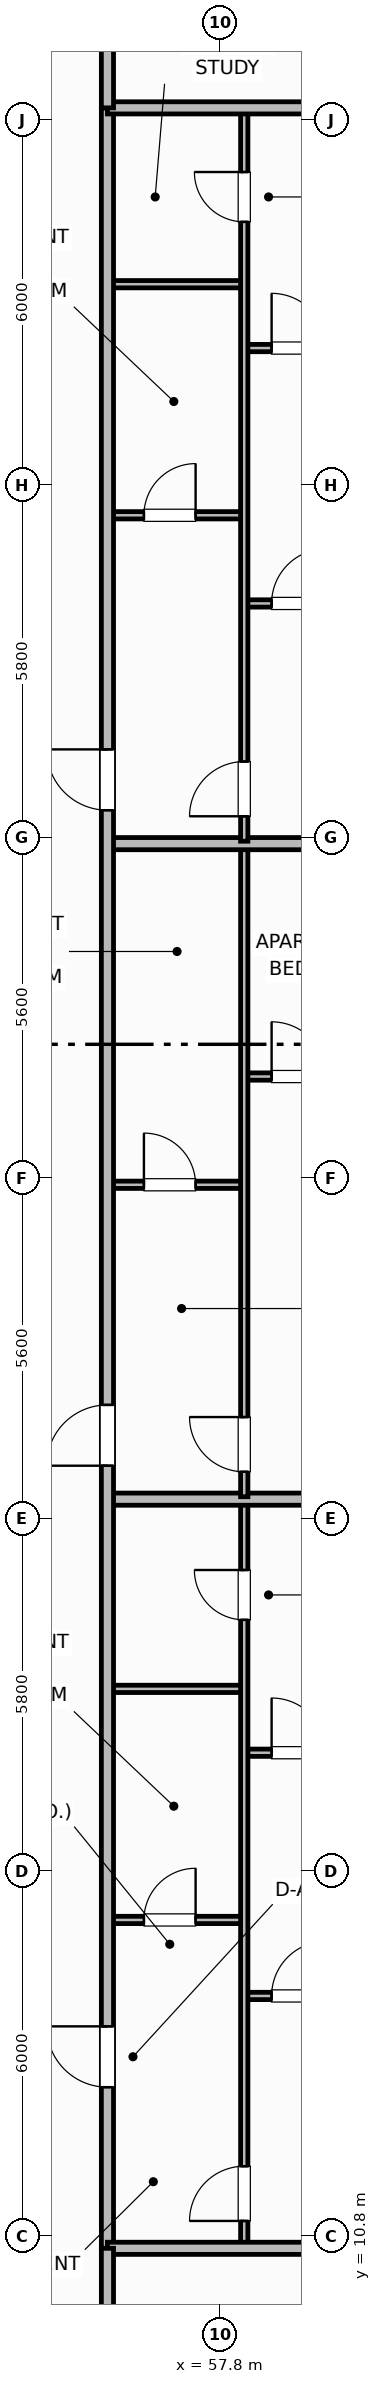
"""IFC4 building model, lengths in metres.
Left out: names, types, materials, properties, quantities, classifications, styles, units other than length and angle.
Written with IfcOpenShell. Run it as: python <this file> out.ifc"""

import sys

from ifc_helpers import new_model, si_unit, direction, frame, frame_2d, origin, place, context, subcontext, project, spatial, rectangle, extrude, element, fill, save


model = new_model("IFC4")
c1 = context("Model", 3, precision=1e-05, world=origin(), true_north=direction((0.0, 1.0)))
c2 = subcontext(c1, "Body", "Model", "MODEL_VIEW")
j1 = project(units=[si_unit("LENGTHUNIT", "METRE"), si_unit("PLANEANGLEUNIT", "RADIAN")], contexts=[c1])
p1 = place(None, origin())
s1 = spatial("IfcSite", under=j1, at=p1, CompositionType="ELEMENT")
p2 = place(p1, origin())
s2 = spatial("IfcBuilding", under=s1, at=p2, CompositionType="ELEMENT")
p3 = place(p2, frame((0.0, 0.0, 73.2)))
s3 = spatial("IfcBuildingStorey", under=s2, at=p3, CompositionType="ELEMENT", Elevation=73.2)
p4 = place(p3, frame((55.95, 16.0, 0.0), z_axis=(0.0, 0.0, 1.0), x_axis=(1.0, 0.0, 0.0)))
e1 = element("IfcWall", 1, at=p4, inside=s3, PredefinedType="PARTITIONING", context=c2, shape_type="SweptSolid", body=[
    extrude(rectangle(XDim=2.25, YDim=0.12, at=frame_2d((1.125, 0.0))), origin(), (0.0, 0.0, 1.0), 2.49),
])
p5 = place(p4, frame((0.6, 0.0, 0.0)))
e2 = element("IfcOpeningElement", 2, at=p5, cuts=e1, PredefinedType="OPENING", context=c2, shape_type="SweptSolid", body=[
    extrude(rectangle(XDim=0.85, YDim=2.1, at=frame_2d((0.425, 1.05))), frame((0.0, 0.07, 0.0), z_axis=(0.0, -1.0, 0.0), x_axis=(1.0, 0.0, 0.0)), (0.0, 0.0, 1.0), 0.14),
])
p6 = place(p3, frame((55.95, 19.8, 0.0), z_axis=(0.0, 0.0, 1.0), x_axis=(1.0, 0.0, 0.0)))
e3 = element("IfcWall", 3, at=p6, inside=s3, PredefinedType="PARTITIONING", context=c2, shape_type="SweptSolid", body=[
    extrude(rectangle(XDim=2.25, YDim=0.12, at=frame_2d((1.125, 0.0))), origin(), (0.0, 0.0, 1.0), 2.49),
])
p7 = place(p3, frame((58.2, 14.75, 0.0), z_axis=(0.0, 0.0, 1.0), x_axis=(1.0, 0.0, 0.0)))
e4 = element("IfcWall", 4, at=p7, inside=s3, PredefinedType="PARTITIONING", context=c2, shape_type="SweptSolid", body=[
    extrude(rectangle(XDim=5.63, YDim=0.12, at=frame_2d((2.815, 0.0))), origin(), (0.0, 0.0, 1.0), 2.49),
])
p8 = place(p7, frame((0.45, 0.0, 0.0)))
e5 = element("IfcOpeningElement", 5, at=p8, cuts=e4, PredefinedType="OPENING", context=c2, shape_type="SweptSolid", body=[
    extrude(rectangle(XDim=0.9, YDim=2.1, at=frame_2d((0.45, 1.05))), frame((0.0, 0.07, 0.0), z_axis=(0.0, -1.0, 0.0), x_axis=(1.0, 0.0, 0.0)), (0.0, 0.0, 1.0), 0.14),
])
p9 = place(p3, frame((58.2, 18.75, 0.0), z_axis=(0.0, 0.0, 1.0), x_axis=(1.0, 0.0, 0.0)))
e6 = element("IfcWall", 6, at=p9, inside=s3, PredefinedType="PARTITIONING", context=c2, shape_type="SweptSolid", body=[
    extrude(rectangle(XDim=5.63, YDim=0.12, at=frame_2d((2.815, 0.0))), origin(), (0.0, 0.0, 1.0), 2.49),
])
p10 = place(p9, frame((0.45, 0.0, 0.0)))
e7 = element("IfcOpeningElement", 7, at=p10, cuts=e6, PredefinedType="OPENING", context=c2, shape_type="SweptSolid", body=[
    extrude(rectangle(XDim=0.9, YDim=2.1, at=frame_2d((0.45, 1.05))), frame((0.0, 0.07, 0.0), z_axis=(0.0, -1.0, 0.0), x_axis=(1.0, 0.0, 0.0)), (0.0, 0.0, 1.0), 0.14),
])
p11 = place(p3, frame((58.2, 10.64, 0.0), z_axis=(0.0, 0.0, 1.0), x_axis=(0.0, 1.0, 0.0)))
e8 = element("IfcWall", 8, at=p11, inside=s3, PredefinedType="PARTITIONING", context=c2, shape_type="SweptSolid", body=[
    extrude(rectangle(XDim=12.24, YDim=0.12, at=frame_2d((6.12, 0.0))), origin(), (0.0, 0.0, 1.0), 2.49),
])
p12 = place(p11, frame((0.41, 0.0, 0.0)))
e9 = element("IfcOpeningElement", 9, at=p12, cuts=e8, PredefinedType="OPENING", context=c2, shape_type="SweptSolid", body=[
    extrude(rectangle(XDim=0.9, YDim=2.1, at=frame_2d((0.45, 1.05))), frame((0.0, 0.07, 0.0), z_axis=(0.0, -1.0, 0.0), x_axis=(1.0, 0.0, 0.0)), (0.0, 0.0, 1.0), 0.14),
])
p13 = place(p11, frame((10.295, 0.0, 0.0)))
e10 = element("IfcOpeningElement", 10, at=p13, cuts=e8, PredefinedType="OPENING", context=c2, shape_type="SweptSolid", body=[
    extrude(rectangle(XDim=0.82, YDim=2.08, at=frame_2d((0.41, 1.04))), frame((0.0, 0.07, 0.0), z_axis=(0.0, -1.0, 0.0), x_axis=(1.0, 0.0, 0.0)), (0.0, 0.0, 1.0), 0.14),
])
p14 = place(p3, frame((55.95, 22.92, 0.0), z_axis=(0.0, 0.0, 1.0), x_axis=(1.0, 0.0, 0.0)))
e11 = element("IfcWall", 11, at=p14, inside=s3, PredefinedType="PARTITIONING", context=c2, shape_type="SweptSolid", body=[
    extrude(rectangle(XDim=7.88, YDim=0.2, at=frame_2d((3.94, 0.0))), origin(), (0.0, 0.0, 1.0), 2.49),
])
p15 = place(p3, frame((55.95, 28.09, 0.0), z_axis=(0.0, 0.0, 1.0), x_axis=(1.0, 0.0, 0.0)))
e12 = element("IfcWall", 12, at=p15, inside=s3, PredefinedType="PARTITIONING", context=c2, shape_type="SweptSolid", body=[
    extrude(rectangle(XDim=2.25, YDim=0.12, at=frame_2d((1.125, 0.0))), origin(), (0.0, 0.0, 1.0), 2.49),
])
p16 = place(p15, frame((0.6, 0.0, 0.0)))
e13 = element("IfcOpeningElement", 13, at=p16, cuts=e12, PredefinedType="OPENING", context=c2, shape_type="SweptSolid", body=[
    extrude(rectangle(XDim=0.85, YDim=2.1, at=frame_2d((0.425, 1.05))), frame((0.0, 0.07, 0.0), z_axis=(0.0, -1.0, 0.0), x_axis=(1.0, 0.0, 0.0)), (0.0, 0.0, 1.0), 0.14),
])
p17 = place(p3, frame((58.2, 29.87, 0.0), z_axis=(0.0, 0.0, 1.0), x_axis=(1.0, 0.0, 0.0)))
e14 = element("IfcWall", 14, at=p17, inside=s3, PredefinedType="PARTITIONING", context=c2, shape_type="SweptSolid", body=[
    extrude(rectangle(XDim=4.947, YDim=0.12, at=frame_2d((2.473, 0.0))), origin(), (0.0, 0.0, 1.0), 2.49),
])
p18 = place(p17, frame((0.45, 0.0, 0.0)))
e15 = element("IfcOpeningElement", 15, at=p18, cuts=e14, PredefinedType="OPENING", context=c2, shape_type="SweptSolid", body=[
    extrude(rectangle(XDim=0.9, YDim=2.1, at=frame_2d((0.45, 1.05))), frame((0.0, 0.07, 0.0), z_axis=(0.0, -1.0, 0.0), x_axis=(1.0, 0.0, 0.0)), (0.0, 0.0, 1.0), 0.14),
])
p19 = place(p3, frame((58.2, 22.96, 0.0), z_axis=(0.0, 0.0, 1.0), x_axis=(0.0, 1.0, 0.0)))
e16 = element("IfcWall", 16, at=p19, inside=s3, PredefinedType="PARTITIONING", context=c2, shape_type="SweptSolid", body=[
    extrude(rectangle(XDim=10.7, YDim=0.12, at=frame_2d((5.35, 0.0))), origin(), (0.0, 0.0, 1.0), 2.49),
])
p20 = place(p19, frame((0.41, 0.0, 0.0)))
e17 = element("IfcOpeningElement", 17, at=p20, cuts=e16, PredefinedType="OPENING", context=c2, shape_type="SweptSolid", body=[
    extrude(rectangle(XDim=0.9, YDim=2.1, at=frame_2d((0.45, 1.05))), frame((0.0, 0.07, 0.0), z_axis=(0.0, -1.0, 0.0), x_axis=(1.0, 0.0, 0.0)), (0.0, 0.0, 1.0), 0.14),
])
p21 = place(p3, frame((55.95, 33.7, 0.0), z_axis=(0.0, 0.0, 1.0), x_axis=(1.0, 0.0, 0.0)))
e18 = element("IfcWall", 18, at=p21, inside=s3, PredefinedType="PARTITIONING", context=c2, shape_type="SweptSolid", body=[
    extrude(rectangle(XDim=7.88, YDim=0.2, at=frame_2d((3.94, 0.0))), origin(), (0.0, 0.0, 1.0), 2.49),
])
p22 = place(p3, frame((55.95, 39.1, 0.0), z_axis=(0.0, 0.0, 1.0), x_axis=(1.0, 0.0, 0.0)))
e19 = element("IfcWall", 19, at=p22, inside=s3, PredefinedType="PARTITIONING", context=c2, shape_type="SweptSolid", body=[
    extrude(rectangle(XDim=2.25, YDim=0.12, at=frame_2d((1.125, 0.0))), origin(), (0.0, 0.0, 1.0), 2.49),
])
p23 = place(p22, frame((0.6, 0.0, 0.0)))
e20 = element("IfcOpeningElement", 20, at=p23, cuts=e19, PredefinedType="OPENING", context=c2, shape_type="SweptSolid", body=[
    extrude(rectangle(XDim=0.85, YDim=2.1, at=frame_2d((0.425, 1.05))), frame((0.0, 0.07, 0.0), z_axis=(0.0, -1.0, 0.0), x_axis=(1.0, 0.0, 0.0)), (0.0, 0.0, 1.0), 0.14),
])
p24 = place(p3, frame((55.95, 42.9, 0.0), z_axis=(0.0, 0.0, 1.0), x_axis=(1.0, 0.0, 0.0)))
e21 = element("IfcWall", 21, at=p24, inside=s3, PredefinedType="PARTITIONING", context=c2, shape_type="SweptSolid", body=[
    extrude(rectangle(XDim=2.25, YDim=0.12, at=frame_2d((1.125, 0.0))), origin(), (0.0, 0.0, 1.0), 2.49),
])
p25 = place(p3, frame((58.2, 37.65, 0.0), z_axis=(0.0, 0.0, 1.0), x_axis=(1.0, 0.0, 0.0)))
e22 = element("IfcWall", 22, at=p25, inside=s3, PredefinedType="PARTITIONING", context=c2, shape_type="SweptSolid", body=[
    extrude(rectangle(XDim=5.63, YDim=0.12, at=frame_2d((2.815, 0.0))), origin(), (0.0, 0.0, 1.0), 2.49),
])
p26 = place(p25, frame((0.45, 0.0, 0.0)))
e23 = element("IfcOpeningElement", 23, at=p26, cuts=e22, PredefinedType="OPENING", context=c2, shape_type="SweptSolid", body=[
    extrude(rectangle(XDim=0.9, YDim=2.1, at=frame_2d((0.45, 1.05))), frame((0.0, 0.07, 0.0), z_axis=(0.0, -1.0, 0.0), x_axis=(1.0, 0.0, 0.0)), (0.0, 0.0, 1.0), 0.14),
])
p27 = place(p3, frame((58.2, 41.85, 0.0), z_axis=(0.0, 0.0, 1.0), x_axis=(1.0, 0.0, 0.0)))
e24 = element("IfcWall", 24, at=p27, inside=s3, PredefinedType="PARTITIONING", context=c2, shape_type="SweptSolid", body=[
    extrude(rectangle(XDim=5.63, YDim=0.12, at=frame_2d((2.815, 0.0))), origin(), (0.0, 0.0, 1.0), 2.49),
])
p28 = place(p27, frame((0.45, 0.0, 0.0)))
e25 = element("IfcOpeningElement", 25, at=p28, cuts=e24, PredefinedType="OPENING", context=c2, shape_type="SweptSolid", body=[
    extrude(rectangle(XDim=0.9, YDim=2.1, at=frame_2d((0.45, 1.05))), frame((0.0, 0.07, 0.0), z_axis=(0.0, -1.0, 0.0), x_axis=(1.0, 0.0, 0.0)), (0.0, 0.0, 1.0), 0.14),
])
p29 = place(p3, frame((58.2, 33.74, 0.0), z_axis=(0.0, 0.0, 1.0), x_axis=(0.0, 1.0, 0.0)))
e26 = element("IfcWall", 26, at=p29, inside=s3, PredefinedType="PARTITIONING", context=c2, shape_type="SweptSolid", body=[
    extrude(rectangle(XDim=12.02, YDim=0.12, at=frame_2d((6.01, 0.0))), origin(), (0.0, 0.0, 1.0), 2.49),
])
p30 = place(p29, frame((0.41, 0.0, 0.0)))
e27 = element("IfcOpeningElement", 27, at=p30, cuts=e26, PredefinedType="OPENING", context=c2, shape_type="SweptSolid", body=[
    extrude(rectangle(XDim=0.9, YDim=2.1, at=frame_2d((0.45, 1.05))), frame((0.0, 0.07, 0.0), z_axis=(0.0, -1.0, 0.0), x_axis=(1.0, 0.0, 0.0)), (0.0, 0.0, 1.0), 0.14),
])
p31 = place(p29, frame((10.185, 0.0, 0.0)))
e28 = element("IfcOpeningElement", 28, at=p31, cuts=e26, PredefinedType="OPENING", context=c2, shape_type="SweptSolid", body=[
    extrude(rectangle(XDim=0.82, YDim=2.08, at=frame_2d((0.41, 1.04))), frame((0.0, 0.07, 0.0), z_axis=(0.0, -1.0, 0.0), x_axis=(1.0, 0.0, 0.0)), (0.0, 0.0, 1.0), 0.14),
])
p32 = place(p3, frame((55.95, 10.6, 0.0), z_axis=(0.0, 0.0, 1.0), x_axis=(0.0, 1.0, 0.0)))
e29 = element("IfcWall", 29, at=p32, inside=s3, PredefinedType="PARTITIONING", context=c2, shape_type="SweptSolid", body=[
    extrude(rectangle(XDim=35.2, YDim=0.2, at=frame_2d((17.6, 0.0))), origin(), (0.0, 0.0, 1.0), 2.49),
])
p33 = place(p32, frame((2.65, 0.0, 0.0)))
e30 = element("IfcOpeningElement", 30, at=p33, cuts=e29, PredefinedType="OPENING", context=c2, shape_type="SweptSolid", body=[
    extrude(rectangle(XDim=1.0, YDim=2.15, at=frame_2d((0.5, 1.075))), frame((0.0, 0.11, 0.0), z_axis=(0.0, -1.0, 0.0), x_axis=(1.0, 0.0, 0.0)), (0.0, 0.0, 1.0), 0.22),
])
p34 = place(p32, frame((12.87, 0.0, 0.0)))
e31 = element("IfcOpeningElement", 31, at=p34, cuts=e29, PredefinedType="OPENING", context=c2, shape_type="SweptSolid", body=[
    extrude(rectangle(XDim=1.0, YDim=2.15, at=frame_2d((0.5, 1.075))), frame((0.0, 0.11, 0.0), z_axis=(0.0, -1.0, 0.0), x_axis=(1.0, 0.0, 0.0)), (0.0, 0.0, 1.0), 0.22),
])
p35 = place(p32, frame((23.65, 0.0, 0.0)))
e32 = element("IfcOpeningElement", 32, at=p35, cuts=e29, PredefinedType="OPENING", context=c2, shape_type="SweptSolid", body=[
    extrude(rectangle(XDim=1.0, YDim=2.15, at=frame_2d((0.5, 1.075))), frame((0.0, 0.11, 0.0), z_axis=(0.0, -1.0, 0.0), x_axis=(1.0, 0.0, 0.0)), (0.0, 0.0, 1.0), 0.22),
])
for number, where, z_axis, x_axis in (
    (33, (55.95, 10.6, 0.0), (0.0, 0.0, 1.0), (1.0, 0.0, 0.0)),
    (34, (55.95, 45.8, 0.0), (0.0, 0.0, 1.0), (1.0, 0.0, 0.0)),
):
    element("IfcWall", number, at=place(p3, frame(where, z_axis=z_axis, x_axis=x_axis)), inside=s3, PredefinedType="PARTITIONING", context=c2, shape_type="SweptSolid", body=[
        extrude(rectangle(XDim=7.46, YDim=0.2, at=frame_2d((3.73, 0.0))), origin(), (0.0, 0.0, 1.0), 2.49),
    ])
p36 = place(p3, frame((55.95, 4.97, 0.0), z_axis=(0.0, 0.0, 1.0), x_axis=(0.0, 1.0, 0.0)))
e35 = element("IfcWall", 35, at=p36, inside=s3, PredefinedType="PARTITIONING", context=c2, shape_type="SweptSolid", body=[
    extrude(rectangle(XDim=5.63, YDim=0.2, at=frame_2d((2.815, 0.0))), origin(), (0.0, 0.0, 1.0), 2.49),
])
p37 = place(p3, frame((55.95, 45.8, 0.0), z_axis=(0.0, 0.0, 1.0), x_axis=(0.0, 1.0, 0.0)))
e36 = element("IfcWall", 36, at=p37, inside=s3, PredefinedType="PARTITIONING", context=c2, shape_type="SweptSolid", body=[
    extrude(rectangle(XDim=5.63, YDim=0.2, at=frame_2d((2.815, 0.0))), origin(), (0.0, 0.0, 1.0), 2.49),
])
p38 = place(p5, origin())
e37 = element("IfcDoor", 37, at=p38, inside=s3, OperationType="SINGLE_SWING_RIGHT", PredefinedType="DOOR", context=c2, shape_type="SweptSolid", body=[
    extrude(rectangle(XDim=0.85, YDim=2.1, at=frame_2d((0.425, 1.05))), frame((0.0, 0.025, 0.0), z_axis=(0.0, -1.0, 0.0), x_axis=(1.0, 0.0, 0.0)), (0.0, 0.0, 1.0), 0.05),
])
fill(e2, e37)
p39 = place(p8, origin())
e38 = element("IfcDoor", 38, at=p39, inside=s3, OperationType="SINGLE_SWING_RIGHT", PredefinedType="DOOR", context=c2, shape_type="SweptSolid", body=[
    extrude(rectangle(XDim=0.9, YDim=2.1, at=frame_2d((0.45, 1.05))), frame((0.0, 0.025, 0.0), z_axis=(0.0, -1.0, 0.0), x_axis=(1.0, 0.0, 0.0)), (0.0, 0.0, 1.0), 0.05),
])
fill(e5, e38)
p40 = place(p10, origin())
e39 = element("IfcDoor", 39, at=p40, inside=s3, OperationType="SINGLE_SWING_LEFT", PredefinedType="DOOR", context=c2, shape_type="SweptSolid", body=[
    extrude(rectangle(XDim=0.9, YDim=2.1, at=frame_2d((0.45, 1.05))), frame((0.0, 0.025, 0.0), z_axis=(0.0, -1.0, 0.0), x_axis=(1.0, 0.0, 0.0)), (0.0, 0.0, 1.0), 0.05),
])
fill(e7, e39)
p41 = place(p12, origin())
e40 = element("IfcDoor", 40, at=p41, inside=s3, OperationType="SINGLE_SWING_LEFT", PredefinedType="DOOR", context=c2, shape_type="SweptSolid", body=[
    extrude(rectangle(XDim=0.9, YDim=2.1, at=frame_2d((0.45, 1.05))), frame((0.0, 0.025, 0.0), z_axis=(0.0, -1.0, 0.0), x_axis=(1.0, 0.0, 0.0)), (0.0, 0.0, 1.0), 0.05),
])
fill(e9, e40)
p42 = place(p13, origin())
e41 = element("IfcDoor", 41, at=p42, inside=s3, OperationType="SINGLE_SWING_RIGHT", PredefinedType="DOOR", context=c2, shape_type="SweptSolid", body=[
    extrude(rectangle(XDim=0.82, YDim=2.08, at=frame_2d((0.41, 1.04))), frame((0.0, 0.025, 0.0), z_axis=(0.0, -1.0, 0.0), x_axis=(1.0, 0.0, 0.0)), (0.0, 0.0, 1.0), 0.05),
])
fill(e10, e41)
p43 = place(p16, origin())
e42 = element("IfcDoor", 42, at=p43, inside=s3, OperationType="SINGLE_SWING_LEFT", PredefinedType="DOOR", context=c2, shape_type="SweptSolid", body=[
    extrude(rectangle(XDim=0.85, YDim=2.1, at=frame_2d((0.425, 1.05))), frame((0.0, 0.025, 0.0), z_axis=(0.0, -1.0, 0.0), x_axis=(1.0, 0.0, 0.0)), (0.0, 0.0, 1.0), 0.05),
])
fill(e13, e42)
p44 = place(p18, origin())
e43 = element("IfcDoor", 43, at=p44, inside=s3, OperationType="SINGLE_SWING_LEFT", PredefinedType="DOOR", context=c2, shape_type="SweptSolid", body=[
    extrude(rectangle(XDim=0.9, YDim=2.1, at=frame_2d((0.45, 1.05))), frame((0.0, 0.025, 0.0), z_axis=(0.0, -1.0, 0.0), x_axis=(1.0, 0.0, 0.0)), (0.0, 0.0, 1.0), 0.05),
])
fill(e15, e43)
p45 = place(p20, origin())
e44 = element("IfcDoor", 44, at=p45, inside=s3, OperationType="SINGLE_SWING_RIGHT", PredefinedType="DOOR", context=c2, shape_type="SweptSolid", body=[
    extrude(rectangle(XDim=0.9, YDim=2.1, at=frame_2d((0.45, 1.05))), frame((0.0, 0.025, 0.0), z_axis=(0.0, -1.0, 0.0), x_axis=(1.0, 0.0, 0.0)), (0.0, 0.0, 1.0), 0.05),
])
fill(e17, e44)
p46 = place(p23, origin())
e45 = element("IfcDoor", 45, at=p46, inside=s3, OperationType="SINGLE_SWING_RIGHT", PredefinedType="DOOR", context=c2, shape_type="SweptSolid", body=[
    extrude(rectangle(XDim=0.85, YDim=2.1, at=frame_2d((0.425, 1.05))), frame((0.0, 0.025, 0.0), z_axis=(0.0, -1.0, 0.0), x_axis=(1.0, 0.0, 0.0)), (0.0, 0.0, 1.0), 0.05),
])
fill(e20, e45)
p47 = place(p26, origin())
e46 = element("IfcDoor", 46, at=p47, inside=s3, OperationType="SINGLE_SWING_RIGHT", PredefinedType="DOOR", context=c2, shape_type="SweptSolid", body=[
    extrude(rectangle(XDim=0.9, YDim=2.1, at=frame_2d((0.45, 1.05))), frame((0.0, 0.025, 0.0), z_axis=(0.0, -1.0, 0.0), x_axis=(1.0, 0.0, 0.0)), (0.0, 0.0, 1.0), 0.05),
])
fill(e23, e46)
p48 = place(p28, origin())
e47 = element("IfcDoor", 47, at=p48, inside=s3, OperationType="SINGLE_SWING_LEFT", PredefinedType="DOOR", context=c2, shape_type="SweptSolid", body=[
    extrude(rectangle(XDim=0.9, YDim=2.1, at=frame_2d((0.45, 1.05))), frame((0.0, 0.025, 0.0), z_axis=(0.0, -1.0, 0.0), x_axis=(1.0, 0.0, 0.0)), (0.0, 0.0, 1.0), 0.05),
])
fill(e25, e47)
p49 = place(p30, origin())
e48 = element("IfcDoor", 48, at=p49, inside=s3, OperationType="SINGLE_SWING_LEFT", PredefinedType="DOOR", context=c2, shape_type="SweptSolid", body=[
    extrude(rectangle(XDim=0.9, YDim=2.1, at=frame_2d((0.45, 1.05))), frame((0.0, 0.025, 0.0), z_axis=(0.0, -1.0, 0.0), x_axis=(1.0, 0.0, 0.0)), (0.0, 0.0, 1.0), 0.05),
])
fill(e27, e48)
p50 = place(p31, origin())
e49 = element("IfcDoor", 49, at=p50, inside=s3, OperationType="SINGLE_SWING_RIGHT", PredefinedType="DOOR", context=c2, shape_type="SweptSolid", body=[
    extrude(rectangle(XDim=0.82, YDim=2.08, at=frame_2d((0.41, 1.04))), frame((0.0, 0.025, 0.0), z_axis=(0.0, -1.0, 0.0), x_axis=(1.0, 0.0, 0.0)), (0.0, 0.0, 1.0), 0.05),
])
fill(e28, e49)
p51 = place(p33, origin())
e50 = element("IfcDoor", 50, at=p51, inside=s3, OperationType="SINGLE_SWING_RIGHT", PredefinedType="DOOR", context=c2, shape_type="SweptSolid", body=[
    extrude(rectangle(XDim=1.0, YDim=2.15, at=frame_2d((0.5, 1.075))), frame((0.0, 0.025, 0.0), z_axis=(0.0, -1.0, 0.0), x_axis=(1.0, 0.0, 0.0)), (0.0, 0.0, 1.0), 0.05),
])
fill(e30, e50)
p52 = place(p34, origin())
e51 = element("IfcDoor", 51, at=p52, inside=s3, OperationType="SINGLE_SWING_LEFT", PredefinedType="DOOR", context=c2, shape_type="SweptSolid", body=[
    extrude(rectangle(XDim=1.0, YDim=2.15, at=frame_2d((0.5, 1.075))), frame((0.0, 0.025, 0.0), z_axis=(0.0, -1.0, 0.0), x_axis=(1.0, 0.0, 0.0)), (0.0, 0.0, 1.0), 0.05),
])
fill(e31, e51)
p53 = place(p35, origin())
e52 = element("IfcDoor", 52, at=p53, inside=s3, OperationType="SINGLE_SWING_RIGHT", PredefinedType="DOOR", context=c2, shape_type="SweptSolid", body=[
    extrude(rectangle(XDim=1.0, YDim=2.15, at=frame_2d((0.5, 1.075))), frame((0.0, 0.025, 0.0), z_axis=(0.0, -1.0, 0.0), x_axis=(1.0, 0.0, 0.0)), (0.0, 0.0, 1.0), 0.05),
])
fill(e32, e52)
save(model, sys.argv[1])
